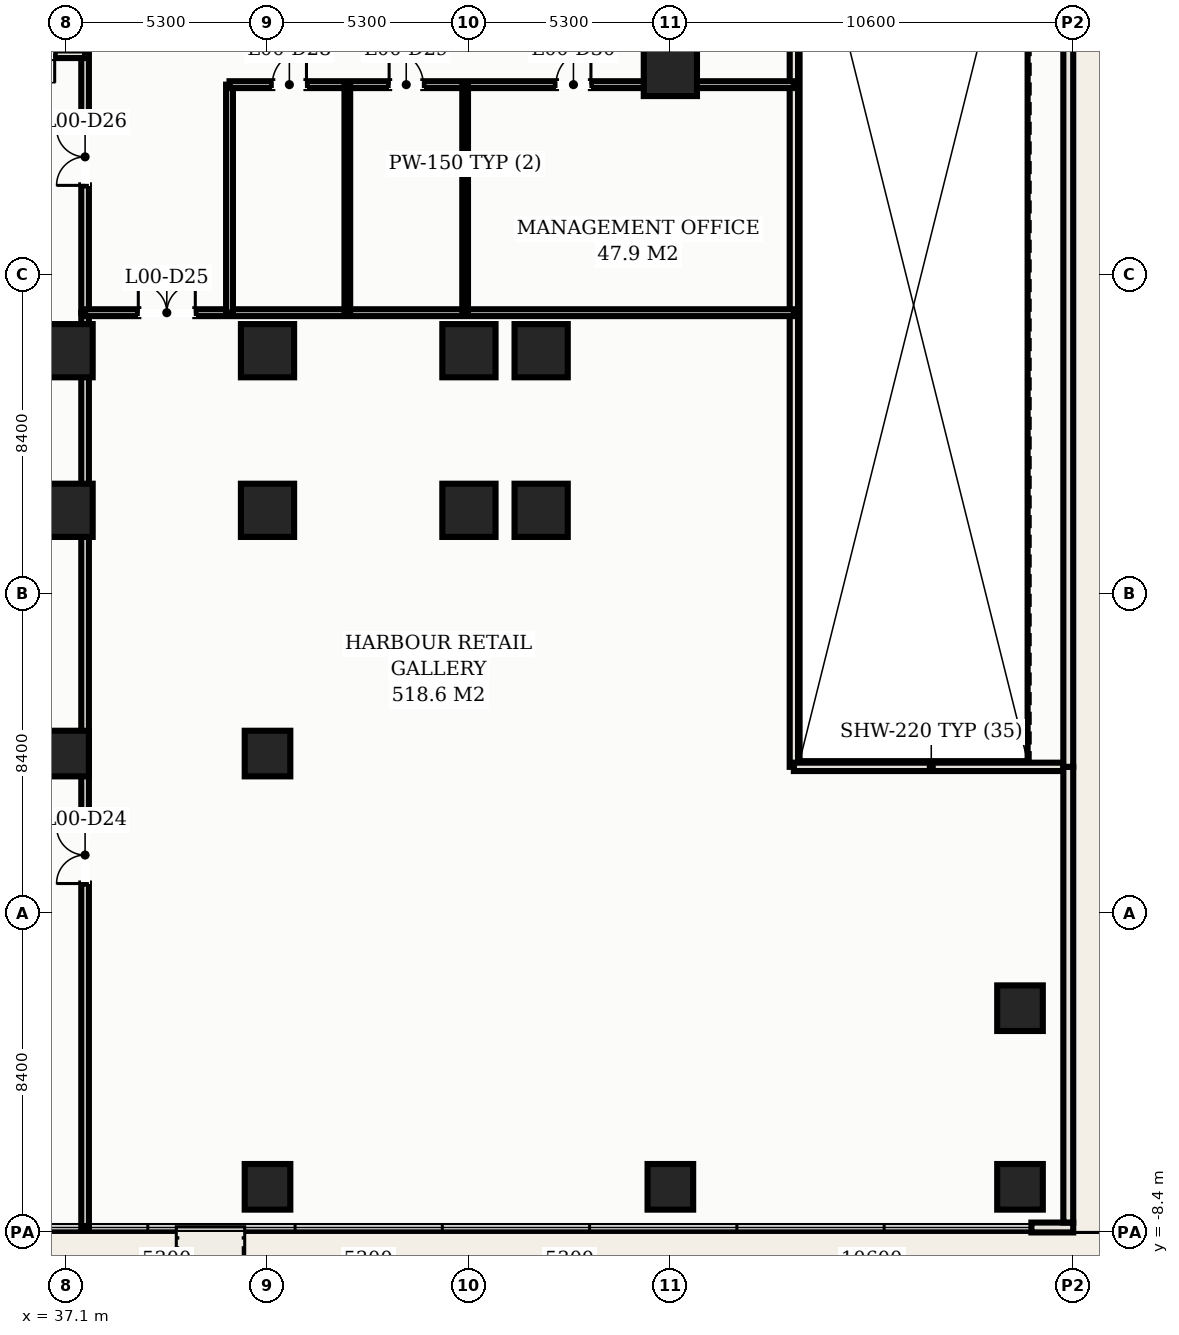
"""IFC4 building model, lengths in metres.
Left out: names, types, materials, properties, quantities, classifications, styles, units other than length and angle.
Written with IfcOpenShell. Run it as: python <this file> out.ifc"""

import sys

from ifc_helpers import new_model, si_unit, direction, frame, frame_2d, origin, origin_2d, place, context, subcontext, project, spatial, rectangle, hollow_rectangle, extrude, element, fill, save


model = new_model("IFC4")
c1 = context("Model", 3, precision=1e-05, world=origin(), true_north=direction((0.0, 1.0)))
c2 = subcontext(c1, "Body", "Model", "MODEL_VIEW")
j1 = project(units=[si_unit("LENGTHUNIT", "METRE"), si_unit("PLANEANGLEUNIT", "RADIAN")], contexts=[c1])
p1 = place(None, origin())
s1 = spatial("IfcSite", under=j1, at=p1, CompositionType="ELEMENT")
p2 = place(p1, origin())
s2 = spatial("IfcBuilding", under=s1, at=p2, CompositionType="ELEMENT")
p3 = place(p2, origin())
s3 = spatial("IfcBuildingStorey", under=s2, at=p3, CompositionType="ELEMENT", Elevation=0.0)
p4 = place(p3, frame((37.1, 14.8, 0.0), z_axis=(0.0, 0.0, 1.0), x_axis=(1.0, 0.0, 0.0)))
e1 = element("IfcColumn", 1, at=p4, inside=s3, PredefinedType="COLUMN", context=c2, shape_type="SweptSolid", body=[
    extrude(hollow_rectangle(XDim=1.4, YDim=1.4, WallThickness=0.045, at=origin_2d()), origin(), (0.0, 0.0, 1.0), 5.2),
])
p5 = place(p3, frame((37.1, 4.2, 0.0), z_axis=(0.0, 0.0, 1.0), x_axis=(1.0, 0.0, 0.0)))
e2 = element("IfcColumn", 2, at=p5, inside=s3, PredefinedType="COLUMN", context=c2, shape_type="SweptSolid", body=[
    extrude(hollow_rectangle(XDim=1.2, YDim=1.2, WallThickness=0.04, at=origin_2d()), origin(), (0.0, 0.0, 1.0), 5.2),
])
for number, where, z_axis, x_axis in (
    (3, (37.1, 10.6, 0.0), (0.0, 0.0, 1.0), (1.0, 0.0, 0.0)),
    (4, (42.4, 14.8, 0.0), (0.0, 0.0, 1.0), (1.0, 0.0, 0.0)),
):
    element("IfcColumn", number, at=place(p3, frame(where, z_axis=z_axis, x_axis=x_axis)), inside=s3, PredefinedType="COLUMN", context=c2, shape_type="SweptSolid", body=[
        extrude(hollow_rectangle(XDim=1.4, YDim=1.4, WallThickness=0.045, at=origin_2d()), origin(), (0.0, 0.0, 1.0), 5.2),
    ])
p6 = place(p3, frame((42.4, 4.2, 0.0), z_axis=(0.0, 0.0, 1.0), x_axis=(1.0, 0.0, 0.0)))
e5 = element("IfcColumn", 5, at=p6, inside=s3, PredefinedType="COLUMN", context=c2, shape_type="SweptSolid", body=[
    extrude(hollow_rectangle(XDim=1.2, YDim=1.2, WallThickness=0.04, at=origin_2d()), origin(), (0.0, 0.0, 1.0), 5.2),
])
for number, where, z_axis, x_axis in (
    (6, (42.4, 10.6, 0.0), (0.0, 0.0, 1.0), (1.0, 0.0, 0.0)),
    (7, (47.7, 10.6, 0.0), (0.0, 0.0, 1.0), (1.0, 0.0, 0.0)),
    (8, (47.7, 14.8, 0.0), (0.0, 0.0, 1.0), (1.0, 0.0, 0.0)),
    (9, (49.6, 10.6, 0.0), (0.0, 0.0, 1.0), (1.0, 0.0, 0.0)),
    (10, (49.6, 14.8, 0.0), (0.0, 0.0, 1.0), (1.0, 0.0, 0.0)),
):
    element("IfcColumn", number, at=place(p3, frame(where, z_axis=z_axis, x_axis=x_axis)), inside=s3, PredefinedType="COLUMN", context=c2, shape_type="SweptSolid", body=[
        extrude(hollow_rectangle(XDim=1.4, YDim=1.4, WallThickness=0.045, at=origin_2d()), origin(), (0.0, 0.0, 1.0), 5.2),
    ])
for number, where, z_axis, x_axis in (
    (11, (42.4, -7.2, 0.0), (0.0, 0.0, 1.0), (1.0, 0.0, 0.0)),
    (12, (53.0, -7.2, 0.0), (0.0, 0.0, 1.0), (1.0, 0.0, 0.0)),
):
    element("IfcColumn", number, at=place(p3, frame(where, z_axis=z_axis, x_axis=x_axis)), inside=s3, PredefinedType="COLUMN", context=c2, shape_type="SweptSolid", body=[
        extrude(hollow_rectangle(XDim=1.2, YDim=1.2, WallThickness=0.04, at=origin_2d()), origin(), (0.0, 0.0, 1.0), 5.2),
    ])
for number, where, z_axis, x_axis in (
    (13, (62.2, -7.2, 0.0), (0.0, 0.0, 1.0), (1.0, 0.0, 0.0)),
    (14, (62.2, -2.5, 0.0), (0.0, 0.0, 1.0), (1.0, 0.0, 0.0)),
):
    element("IfcColumn", number, at=place(p3, frame(where, z_axis=z_axis, x_axis=x_axis)), inside=s3, PredefinedType="COLUMN", context=c2, shape_type="SweptSolid", body=[
        extrude(hollow_rectangle(XDim=1.2, YDim=1.2, WallThickness=0.04, at=origin_2d()), origin(), (0.0, 0.0, 1.0), 5.164),
    ])
p7 = place(p3, frame((53.0, 22.2, 0.0), z_axis=(0.0, 0.0, 1.0), x_axis=(1.0, 0.0, 0.0)))
e15 = element("IfcColumn", 15, at=p7, inside=s3, PredefinedType="COLUMN", context=c2, shape_type="SweptSolid", body=[
    extrude(hollow_rectangle(XDim=1.4, YDim=1.4, WallThickness=0.045, at=origin_2d()), origin(), (0.0, 0.0, 1.0), 5.2),
])
p8 = place(p3, frame((56.25, 3.85, 0.0), z_axis=(0.0, 0.0, 1.0), x_axis=(0.0, 1.0, 0.0)))
e16 = element("IfcWall", 16, at=p8, inside=s3, PredefinedType="SOLIDWALL", context=c2, shape_type="SweptSolid", body=[
    extrude(rectangle(XDim=31.35, YDim=0.22, at=frame_2d((15.675, 0.0))), origin(), (0.0, 0.0, 1.0), 4.95),
])
p9 = place(p3, frame((56.25, 3.85, 0.0), z_axis=(0.0, 0.0, 1.0), x_axis=(1.0, 0.0, 0.0)))
e17 = element("IfcWall", 17, at=p9, inside=s3, PredefinedType="SOLIDWALL", context=c2, shape_type="SweptSolid", body=[
    extrude(rectangle(XDim=7.23, YDim=0.22, at=frame_2d((3.615, 0.0))), origin(), (0.0, 0.0, 1.0), 4.95),
])
p10 = place(p3, frame((62.5, -8.27, 0.0), z_axis=(0.0, 0.0, 1.0), x_axis=(1.0, 0.0, 0.0)))
e18 = element("IfcWall", 18, at=p10, inside=s3, PredefinedType="SOLIDWALL", context=c2, shape_type="SweptSolid", body=[
    extrude(rectangle(XDim=1.1, YDim=0.26, at=frame_2d((0.55, 0.0))), origin(), (0.0, 0.0, 1.0), 4.95),
])
p11 = place(p3, frame((63.47, -8.14, 0.0), z_axis=(0.0, 0.0, 1.0), x_axis=(0.0, 1.0, 0.0)))
e19 = element("IfcWall", 19, at=p11, inside=s3, PredefinedType="SOLIDWALL", context=c2, shape_type="SweptSolid", body=[
    extrude(rectangle(XDim=11.99, YDim=0.26, at=frame_2d((5.995, 0.0))), origin(), (0.0, 0.0, 1.0), 4.95),
])
p12 = place(p3, frame((63.47, 3.85, 0.0), z_axis=(0.0, 0.0, 1.0), x_axis=(0.0, 1.0, 0.0)))
e20 = element("IfcWall", 20, at=p12, inside=s3, PredefinedType="SOLIDWALL", context=c2, shape_type="SweptSolid", body=[
    extrude(rectangle(XDim=31.35, YDim=0.26, at=frame_2d((15.675, 0.0))), origin(), (0.0, 0.0, 1.0), 4.95),
])
p13 = place(p12, frame((24.45, 0.0, 0.0)))
e21 = element("IfcOpeningElement", 21, at=p13, cuts=e20, PredefinedType="OPENING", context=c2, shape_type="SweptSolid", body=[
    extrude(rectangle(XDim=5.8, YDim=3.1, at=frame_2d((2.9, 1.55))), frame((0.0, 0.14, 0.0), z_axis=(0.0, -1.0, 0.0), x_axis=(1.0, 0.0, 0.0)), (0.0, 0.0, 1.0), 0.28),
])
p14 = place(p3, frame((37.6, -8.27, 0.0), z_axis=(0.0, 0.0, 1.0), x_axis=(0.0, 1.0, 0.0)))
e22 = element("IfcWall", 22, at=p14, inside=s3, PredefinedType="PARTITIONING", context=c2, shape_type="SweptSolid", body=[
    extrude(rectangle(XDim=24.07, YDim=0.2, at=frame_2d((12.035, 0.0))), origin(), (0.0, 0.0, 1.0), 4.95),
])
p15 = place(p14, frame((9.05, 0.0, 0.0)))
e23 = element("IfcOpeningElement", 23, at=p15, cuts=e22, PredefinedType="OPENING", context=c2, shape_type="SweptSolid", body=[
    extrude(rectangle(XDim=1.5, YDim=2.25, at=frame_2d((0.75, 1.125))), frame((0.0, 0.11, 0.0), z_axis=(0.0, -1.0, 0.0), x_axis=(1.0, 0.0, 0.0)), (0.0, 0.0, 1.0), 0.22),
])
p16 = place(p3, frame((37.6, 15.8, 0.0), z_axis=(0.0, 0.0, 1.0), x_axis=(0.0, 1.0, 0.0)))
e24 = element("IfcWall", 24, at=p16, inside=s3, PredefinedType="PARTITIONING", context=c2, shape_type="SweptSolid", body=[
    extrude(rectangle(XDim=6.8, YDim=0.2, at=frame_2d((3.4, 0.0))), origin(), (0.0, 0.0, 1.0), 4.95),
])
p17 = place(p16, frame((3.35, 0.0, 0.0)))
e25 = element("IfcOpeningElement", 25, at=p17, cuts=e24, PredefinedType="OPENING", context=c2, shape_type="SweptSolid", body=[
    extrude(rectangle(XDim=1.5, YDim=2.25, at=frame_2d((0.75, 1.125))), frame((0.0, 0.11, 0.0), z_axis=(0.0, -1.0, 0.0), x_axis=(1.0, 0.0, 0.0)), (0.0, 0.0, 1.0), 0.22),
])
p18 = place(p3, frame((34.55, 22.6, 0.0), z_axis=(0.0, 0.0, 1.0), x_axis=(1.0, 0.0, 0.0)))
e26 = element("IfcWall", 26, at=p18, inside=s3, PredefinedType="PARTITIONING", context=c2, shape_type="SweptSolid", body=[
    extrude(rectangle(XDim=3.05, YDim=0.2, at=frame_2d((1.525, 0.0))), origin(), (0.0, 0.0, 1.0), 4.95),
])
p19 = place(p18, frame((0.75, 0.0, 0.0)))
e27 = element("IfcOpeningElement", 27, at=p19, cuts=e26, PredefinedType="OPENING", context=c2, shape_type="SweptSolid", body=[
    extrude(rectangle(XDim=1.5, YDim=2.25, at=frame_2d((0.75, 1.125))), frame((0.0, 0.11, 0.0), z_axis=(0.0, -1.0, 0.0), x_axis=(1.0, 0.0, 0.0)), (0.0, 0.0, 1.0), 0.22),
])
p20 = place(p3, frame((37.6, 15.8, 0.0), z_axis=(0.0, 0.0, 1.0), x_axis=(1.0, 0.0, 0.0)))
e28 = element("IfcWall", 28, at=p20, inside=s3, PredefinedType="PARTITIONING", context=c2, shape_type="SweptSolid", body=[
    extrude(rectangle(XDim=18.65, YDim=0.18, at=frame_2d((9.325, 0.0))), origin(), (0.0, 0.0, 1.0), 4.95),
])
p21 = place(p20, frame((1.4, 0.0, 0.0)))
e29 = element("IfcOpeningElement", 29, at=p21, cuts=e28, PredefinedType="OPENING", context=c2, shape_type="SweptSolid", body=[
    extrude(rectangle(XDim=1.5, YDim=2.25, at=frame_2d((0.75, 1.125))), frame((0.0, 0.1, 0.0), z_axis=(0.0, -1.0, 0.0), x_axis=(1.0, 0.0, 0.0)), (0.0, 0.0, 1.0), 0.2),
])
p22 = place(p3, frame((41.4, 15.8, 0.0), z_axis=(0.0, 0.0, 1.0), x_axis=(0.0, 1.0, 0.0)))
e30 = element("IfcWall", 30, at=p22, inside=s3, PredefinedType="PARTITIONING", context=c2, shape_type="SweptSolid", body=[
    extrude(rectangle(XDim=6.0, YDim=0.18, at=frame_2d((3.0, 0.0))), origin(), (0.0, 0.0, 1.0), 4.95),
])
p23 = place(p3, frame((41.4, 21.8, 0.0), z_axis=(0.0, 0.0, 1.0), x_axis=(1.0, 0.0, 0.0)))
e31 = element("IfcWall", 31, at=p23, inside=s3, PredefinedType="PARTITIONING", context=c2, shape_type="SweptSolid", body=[
    extrude(rectangle(XDim=14.85, YDim=0.18, at=frame_2d((7.425, 0.0))), origin(), (0.0, 0.0, 1.0), 4.95),
])
p24 = place(p23, frame((1.125, 0.0, 0.0)))
e32 = element("IfcOpeningElement", 32, at=p24, cuts=e31, PredefinedType="OPENING", context=c2, shape_type="SweptSolid", body=[
    extrude(rectangle(XDim=0.9, YDim=2.15, at=frame_2d((0.45, 1.075))), frame((0.0, 0.1, 0.0), z_axis=(0.0, -1.0, 0.0), x_axis=(1.0, 0.0, 0.0)), (0.0, 0.0, 1.0), 0.2),
])
p25 = place(p23, frame((4.2, 0.0, 0.0)))
e33 = element("IfcOpeningElement", 33, at=p25, cuts=e31, PredefinedType="OPENING", context=c2, shape_type="SweptSolid", body=[
    extrude(rectangle(XDim=0.9, YDim=2.15, at=frame_2d((0.45, 1.075))), frame((0.0, 0.1, 0.0), z_axis=(0.0, -1.0, 0.0), x_axis=(1.0, 0.0, 0.0)), (0.0, 0.0, 1.0), 0.2),
])
p26 = place(p23, frame((8.59, 0.0, 0.0)))
e34 = element("IfcOpeningElement", 34, at=p26, cuts=e31, PredefinedType="OPENING", context=c2, shape_type="SweptSolid", body=[
    extrude(rectangle(XDim=0.92, YDim=2.15, at=frame_2d((0.46, 1.075))), frame((0.0, 0.1, 0.0), z_axis=(0.0, -1.0, 0.0), x_axis=(1.0, 0.0, 0.0)), (0.0, 0.0, 1.0), 0.2),
])
p27 = place(p3, frame((44.5, 15.8, 0.0), z_axis=(0.0, 0.0, 1.0), x_axis=(0.0, 1.0, 0.0)))
e35 = element("IfcWall", 35, at=p27, inside=s3, PredefinedType="PARTITIONING", context=c2, shape_type="SweptSolid", body=[
    extrude(rectangle(XDim=6.0, YDim=0.15, at=frame_2d((3.0, 0.0))), origin(), (0.0, 0.0, 1.0), 4.95),
])
p28 = place(p3, frame((47.6, 15.8, 0.0), z_axis=(0.0, 0.0, 1.0), x_axis=(0.0, 1.0, 0.0)))
e36 = element("IfcWall", 36, at=p28, inside=s3, PredefinedType="PARTITIONING", context=c2, shape_type="SweptSolid", body=[
    extrude(rectangle(XDim=6.0, YDim=0.15, at=frame_2d((3.0, 0.0))), origin(), (0.0, 0.0, 1.0), 4.095),
])
p29 = place(p15, origin())
e37 = element("IfcDoor", 37, at=p29, inside=s3, OperationType="DOUBLE_DOOR_SINGLE_SWING", PredefinedType="DOOR", context=c2, shape_type="SweptSolid", body=[
    extrude(rectangle(XDim=1.5, YDim=2.25, at=frame_2d((0.75, 1.125))), frame((0.0, 0.025, 0.0), z_axis=(0.0, -1.0, 0.0), x_axis=(1.0, 0.0, 0.0)), (0.0, 0.0, 1.0), 0.05),
])
fill(e23, e37)
p30 = place(p21, origin())
e38 = element("IfcDoor", 38, at=p30, inside=s3, OperationType="DOUBLE_DOOR_SINGLE_SWING", PredefinedType="DOOR", context=c2, shape_type="SweptSolid", body=[
    extrude(rectangle(XDim=1.5, YDim=2.25, at=frame_2d((0.75, 1.125))), frame((0.0, 0.025, 0.0), z_axis=(0.0, -1.0, 0.0), x_axis=(1.0, 0.0, 0.0)), (0.0, 0.0, 1.0), 0.05),
])
fill(e29, e38)
p31 = place(p17, origin())
e39 = element("IfcDoor", 39, at=p31, inside=s3, OperationType="DOUBLE_DOOR_SINGLE_SWING", PredefinedType="DOOR", context=c2, shape_type="SweptSolid", body=[
    extrude(rectangle(XDim=1.5, YDim=2.25, at=frame_2d((0.75, 1.125))), frame((0.0, 0.025, 0.0), z_axis=(0.0, -1.0, 0.0), x_axis=(1.0, 0.0, 0.0)), (0.0, 0.0, 1.0), 0.05),
])
fill(e25, e39)
p32 = place(p19, frame((1.5, 0.0, 0.0), z_axis=(0.0, 0.0, 1.0), x_axis=(-1.0, 0.0, 0.0)))
e40 = element("IfcDoor", 40, at=p32, inside=s3, OperationType="DOUBLE_DOOR_SINGLE_SWING", PredefinedType="DOOR", context=c2, shape_type="SweptSolid", body=[
    extrude(rectangle(XDim=1.5, YDim=2.25, at=frame_2d((0.75, 1.125))), frame((0.0, 0.025, 0.0), z_axis=(0.0, -1.0, 0.0), x_axis=(1.0, 0.0, 0.0)), (0.0, 0.0, 1.0), 0.05),
])
fill(e27, e40)
p33 = place(p24, origin())
e41 = element("IfcDoor", 41, at=p33, inside=s3, OperationType="SINGLE_SWING_RIGHT", PredefinedType="DOOR", context=c2, shape_type="SweptSolid", body=[
    extrude(rectangle(XDim=0.9, YDim=2.15, at=frame_2d((0.45, 1.075))), frame((0.0, 0.025, 0.0), z_axis=(0.0, -1.0, 0.0), x_axis=(1.0, 0.0, 0.0)), (0.0, 0.0, 1.0), 0.05),
])
fill(e32, e41)
p34 = place(p25, origin())
e42 = element("IfcDoor", 42, at=p34, inside=s3, OperationType="SINGLE_SWING_LEFT", PredefinedType="DOOR", context=c2, shape_type="SweptSolid", body=[
    extrude(rectangle(XDim=0.9, YDim=2.15, at=frame_2d((0.45, 1.075))), frame((0.0, 0.025, 0.0), z_axis=(0.0, -1.0, 0.0), x_axis=(1.0, 0.0, 0.0)), (0.0, 0.0, 1.0), 0.05),
])
fill(e33, e42)
p35 = place(p26, origin())
e43 = element("IfcDoor", 43, at=p35, inside=s3, OperationType="SINGLE_SWING_RIGHT", PredefinedType="DOOR", context=c2, shape_type="SweptSolid", body=[
    extrude(rectangle(XDim=0.92, YDim=2.15, at=frame_2d((0.46, 1.075))), frame((0.0, 0.025, 0.0), z_axis=(0.0, -1.0, 0.0), x_axis=(1.0, 0.0, 0.0)), (0.0, 0.0, 1.0), 0.05),
])
fill(e34, e43)
save(model, sys.argv[1])
